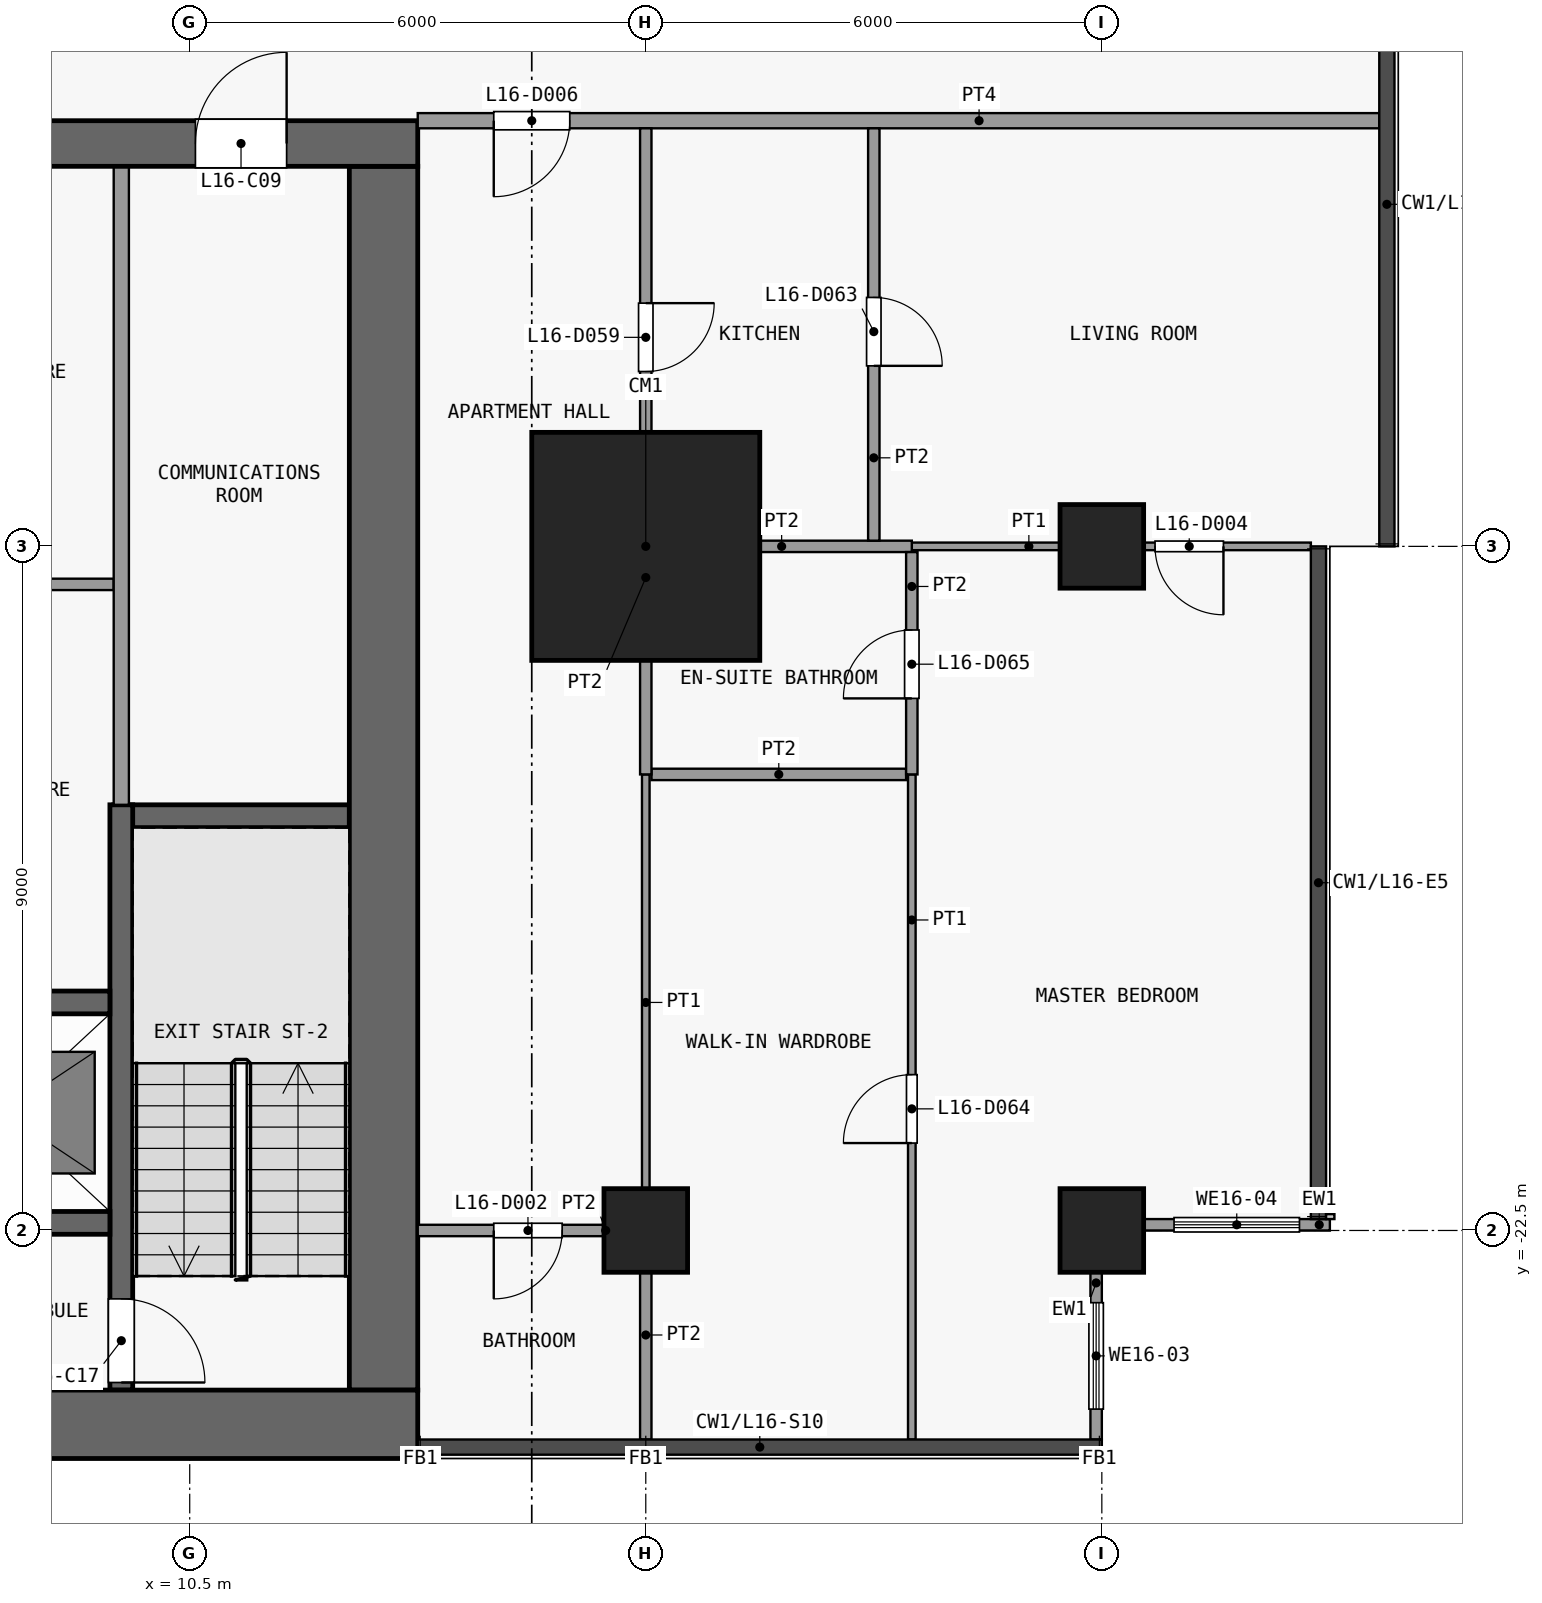
"""IFC4 building model, lengths in metres.
Left out: names, types, materials, properties, quantities, classifications, styles, units other than length and angle.
Written with IfcOpenShell. Run it as: python <this file> out.ifc"""

import sys

from ifc_helpers import new_model, si_unit, direction, frame, frame_2d, origin, origin_2d, place, context, subcontext, project, spatial, rectangle, extrude, element, fill, save


model = new_model("IFC4")
c1 = context("Model", 3, precision=1e-05, world=origin(), true_north=direction((0.0, 1.0)))
c2 = subcontext(c1, "Body", "Model", "MODEL_VIEW")
j1 = project(units=[si_unit("LENGTHUNIT", "METRE"), si_unit("PLANEANGLEUNIT", "RADIAN")], contexts=[c1])
p1 = place(None, origin())
s1 = spatial("IfcSite", under=j1, at=p1, CompositionType="ELEMENT")
p2 = place(p1, origin())
s2 = spatial("IfcBuilding", under=s1, at=p2, CompositionType="ELEMENT")
p3 = place(p2, frame((0.0, 0.0, 68.5)))
s3 = spatial("IfcBuildingStorey", under=s2, at=p3, CompositionType="ELEMENT", Elevation=68.5)
p4 = place(p3, frame((16.5, -22.5, 0.0), z_axis=(0.0, 0.0, 1.0), x_axis=(1.0, 0.0, 0.0)))
e1 = element("IfcColumn", 1, at=p4, inside=s3, PredefinedType="COLUMN", context=c2, shape_type="SweptSolid", body=[
    extrude(rectangle(XDim=1.1, YDim=1.1, at=origin_2d()), origin(), (0.0, 0.0, 1.0), 3.6),
])
p5 = place(p3, frame((16.5, -13.5, 0.0), z_axis=(0.0, 0.0, 1.0), x_axis=(1.0, 0.0, 0.0)))
e2 = element("IfcColumn", 2, at=p5, inside=s3, PredefinedType="COLUMN", context=c2, shape_type="SweptSolid", body=[
    extrude(rectangle(XDim=3.0, YDim=3.0, at=origin_2d()), origin(), (0.0, 0.0, 1.0), 3.6),
])
for number, where, z_axis, x_axis in (
    (3, (22.5, -22.5, 0.0), (0.0, 0.0, 1.0), (1.0, 0.0, 0.0)),
    (4, (22.5, -13.5, 0.0), (0.0, 0.0, 1.0), (1.0, 0.0, 0.0)),
):
    element("IfcColumn", number, at=place(p3, frame(where, z_axis=z_axis, x_axis=x_axis)), inside=s3, PredefinedType="COLUMN", context=c2, shape_type="SweptSolid", body=[
        extrude(rectangle(XDim=1.1, YDim=1.1, at=origin_2d()), origin(), (0.0, 0.0, 1.0), 3.6),
    ])
p6 = place(p3, frame((-13.5, -25.05, 0.0), z_axis=(0.0, 0.0, 1.0), x_axis=(1.0, 0.0, 0.0)))
e5 = element("IfcWall", 5, at=p6, inside=s3, PredefinedType="SHEAR", context=c2, shape_type="SweptSolid", body=[
    extrude(rectangle(XDim=27.0, YDim=0.9, at=frame_2d((13.5, 0.0))), origin(), (0.0, 0.0, 1.0), 3.3),
])
p7 = place(p3, frame((-13.5, -8.2, 0.0), z_axis=(0.0, 0.0, 1.0), x_axis=(1.0, 0.0, 0.0)))
e6 = element("IfcWall", 6, at=p7, inside=s3, PredefinedType="SHEAR", context=c2, shape_type="SweptSolid", body=[
    extrude(rectangle(XDim=27.0, YDim=0.6, at=frame_2d((13.5, 0.0))), origin(), (0.0, 0.0, 1.0), 3.3),
])
p8 = place(p7, frame((7.8, 0.0, 0.0)))
e7 = element("IfcOpeningElement", 7, at=p8, cuts=e6, PredefinedType="OPENING", context=c2, shape_type="SweptSolid", body=[
    extrude(rectangle(XDim=1.8, YDim=2.1, at=frame_2d((0.9, 1.05))), frame((0.0, 0.31, 0.0), z_axis=(0.0, -1.0, 0.0), x_axis=(1.0, 0.0, 0.0)), (0.0, 0.0, 1.0), 0.62),
])
p9 = place(p7, frame((17.4, 0.0, 0.0)))
e8 = element("IfcOpeningElement", 8, at=p9, cuts=e6, PredefinedType="OPENING", context=c2, shape_type="SweptSolid", body=[
    extrude(rectangle(XDim=1.8, YDim=2.1, at=frame_2d((0.9, 1.05))), frame((0.0, 0.31, 0.0), z_axis=(0.0, -1.0, 0.0), x_axis=(1.0, 0.0, 0.0)), (0.0, 0.0, 1.0), 0.62),
])
p10 = place(p7, frame((2.725, 0.0, 0.0)))
e9 = element("IfcOpeningElement", 9, at=p10, cuts=e6, PredefinedType="OPENING", context=c2, shape_type="SweptSolid", body=[
    extrude(rectangle(XDim=0.9, YDim=2.1, at=frame_2d((0.45, 1.05))), frame((0.0, 0.31, 0.0), z_axis=(0.0, -1.0, 0.0), x_axis=(1.0, 0.0, 0.0)), (0.0, 0.0, 1.0), 0.62),
])
p11 = place(p7, frame((24.075, 0.0, 0.0)))
e10 = element("IfcOpeningElement", 10, at=p11, cuts=e6, PredefinedType="OPENING", context=c2, shape_type="SweptSolid", body=[
    extrude(rectangle(XDim=1.2, YDim=2.1, at=frame_2d((0.6, 1.05))), frame((0.0, 0.31, 0.0), z_axis=(0.0, -1.0, 0.0), x_axis=(1.0, 0.0, 0.0)), (0.0, 0.0, 1.0), 0.62),
])
p12 = place(p3, frame((13.05, -24.6, 0.0), z_axis=(0.0, 0.0, 1.0), x_axis=(0.0, 1.0, 0.0)))
e11 = element("IfcWall", 11, at=p12, inside=s3, PredefinedType="SHEAR", context=c2, shape_type="SweptSolid", body=[
    extrude(rectangle(XDim=16.1, YDim=0.9, at=frame_2d((8.05, 0.0))), origin(), (0.0, 0.0, 1.0), 3.3),
])
p13 = place(p3, frame((6.35, -22.4, 0.0), z_axis=(0.0, 0.0, 1.0), x_axis=(1.0, 0.0, 0.0)))
e12 = element("IfcWall", 12, at=p13, inside=s3, PredefinedType="SHEAR", context=c2, shape_type="SweptSolid", body=[
    extrude(rectangle(XDim=3.1, YDim=0.3, at=frame_2d((1.55, 0.0))), origin(), (0.0, 0.0, 1.0), 3.3),
])
p14 = place(p3, frame((6.425, -19.5, 0.0), z_axis=(0.0, 0.0, 1.0), x_axis=(1.0, 0.0, 0.0)))
e13 = element("IfcWall", 13, at=p14, inside=s3, PredefinedType="SHEAR", context=c2, shape_type="SweptSolid", body=[
    extrude(rectangle(XDim=3.025, YDim=0.3, at=frame_2d((1.512, 0.0))), origin(), (0.0, 0.0, 1.0), 3.3),
])
p15 = place(p3, frame((9.5, -17.05, 0.0), z_axis=(0.0, 0.0, 1.0), x_axis=(1.0, 0.0, 0.0)))
e14 = element("IfcWall", 14, at=p15, inside=s3, PredefinedType="SHEAR", context=c2, shape_type="SweptSolid", body=[
    extrude(rectangle(XDim=3.1, YDim=0.3, at=frame_2d((1.55, 0.0))), origin(), (0.0, 0.0, 1.0), 3.3),
])
p16 = place(p3, frame((6.575, -14.0, 0.0), z_axis=(0.0, 0.0, 1.0), x_axis=(1.0, 0.0, 0.0)))
e15 = element("IfcWall", 15, at=p16, inside=s3, PredefinedType="PARTITIONING", context=c2, shape_type="SweptSolid", body=[
    extrude(rectangle(XDim=2.925, YDim=0.15, at=frame_2d((1.462, 0.0))), origin(), (0.0, 0.0, 1.0), 3.3),
])
p17 = place(p3, frame((9.6, -16.9, 0.0), z_axis=(0.0, 0.0, 1.0), x_axis=(0.0, -1.0, 0.0)))
e16 = element("IfcWall", 16, at=p17, inside=s3, PredefinedType="SHEAR", context=c2, shape_type="SweptSolid", body=[
    extrude(rectangle(XDim=7.7, YDim=0.3, at=frame_2d((3.85, 0.0))), origin(), (0.0, 0.0, 1.0), 3.3),
])
p18 = place(p17, frame((6.5, 0.0, 0.0)))
e17 = element("IfcOpeningElement", 17, at=p18, cuts=e16, PredefinedType="OPENING", context=c2, shape_type="SweptSolid", body=[
    extrude(rectangle(XDim=1.1, YDim=2.1, at=frame_2d((0.55, 1.05))), frame((0.0, 0.16, 0.0), z_axis=(0.0, -1.0, 0.0), x_axis=(1.0, 0.0, 0.0)), (0.0, 0.0, 1.0), 0.32),
])
p19 = place(p3, frame((9.6, -16.9, 0.0), z_axis=(0.0, 0.0, 1.0), x_axis=(0.0, 1.0, 0.0)))
e18 = element("IfcWall", 18, at=p19, inside=s3, PredefinedType="PARTITIONING", context=c2, shape_type="SweptSolid", body=[
    extrude(rectangle(XDim=8.4, YDim=0.2, at=frame_2d((4.2, 0.0))), origin(), (0.0, 0.0, 1.0), 3.3),
])
p20 = place(p3, frame((22.425, -23.05, 0.0), z_axis=(0.0, 0.0, 1.0), x_axis=(0.0, -1.0, 0.0)))
e19 = element("IfcWall", 19, at=p20, inside=s3, PredefinedType="SOLIDWALL", context=c2, shape_type="SweptSolid", body=[
    extrude(rectangle(XDim=2.2, YDim=0.15, at=frame_2d((1.1, 0.0))), origin(), (0.0, 0.0, 1.0), 3.3),
])
p21 = place(p20, frame((0.4, 0.0, 0.9)))
e20 = element("IfcOpeningElement", 20, at=p21, cuts=e19, PredefinedType="OPENING", context=c2, shape_type="SweptSolid", body=[
    extrude(rectangle(XDim=1.4, YDim=2.4, at=frame_2d((0.7, 1.2))), frame((0.0, 0.085, 0.0), z_axis=(0.0, -1.0, 0.0), x_axis=(1.0, 0.0, 0.0)), (0.0, 0.0, 1.0), 0.17),
])
p22 = place(p3, frame((25.5, -22.425, 0.0), z_axis=(0.0, 0.0, 1.0), x_axis=(-1.0, 0.0, 0.0)))
e21 = element("IfcWall", 21, at=p22, inside=s3, PredefinedType="SOLIDWALL", context=c2, shape_type="SweptSolid", body=[
    extrude(rectangle(XDim=2.45, YDim=0.15, at=frame_2d((1.225, 0.0))), origin(), (0.0, 0.0, 1.0), 3.3),
])
p23 = place(p22, frame((0.4, 0.0, 0.9)))
e22 = element("IfcOpeningElement", 22, at=p23, cuts=e21, PredefinedType="OPENING", context=c2, shape_type="SweptSolid", body=[
    extrude(rectangle(XDim=1.65, YDim=2.4, at=frame_2d((0.825, 1.2))), frame((0.0, 0.085, 0.0), z_axis=(0.0, -1.0, 0.0), x_axis=(1.0, 0.0, 0.0)), (0.0, 0.0, 1.0), 0.17),
])
p24 = place(p3, frame((13.5, -22.5, 0.0), z_axis=(0.0, 0.0, 1.0), x_axis=(1.0, 0.0, 0.0)))
e23 = element("IfcWall", 23, at=p24, inside=s3, PredefinedType="PARTITIONING", context=c2, shape_type="SweptSolid", body=[
    extrude(rectangle(XDim=2.925, YDim=0.15, at=frame_2d((1.462, 0.0))), origin(), (0.0, 0.0, 1.0), 3.3),
])
p25 = place(p24, frame((1.0, 0.0, 0.0)))
e24 = element("IfcOpeningElement", 24, at=p25, cuts=e23, PredefinedType="OPENING", context=c2, shape_type="SweptSolid", body=[
    extrude(rectangle(XDim=0.9, YDim=2.1, at=frame_2d((0.45, 1.05))), frame((0.0, 0.085, 0.0), z_axis=(0.0, -1.0, 0.0), x_axis=(1.0, 0.0, 0.0)), (0.0, 0.0, 1.0), 0.17),
])
p26 = place(p3, frame((16.575, -16.5, 0.0), z_axis=(0.0, 0.0, 1.0), x_axis=(1.0, 0.0, 0.0)))
e25 = element("IfcWall", 25, at=p26, inside=s3, PredefinedType="PARTITIONING", context=c2, shape_type="SweptSolid", body=[
    extrude(rectangle(XDim=3.35, YDim=0.15, at=frame_2d((1.675, 0.0))), origin(), (0.0, 0.0, 1.0), 3.3),
])
p27 = place(p3, frame((20.0, -13.5, 0.0), z_axis=(0.0, 0.0, 1.0), x_axis=(1.0, 0.0, 0.0)))
e26 = element("IfcWall", 26, at=p27, inside=s3, PredefinedType="PARTITIONING", context=c2, shape_type="SweptSolid", body=[
    extrude(rectangle(XDim=5.25, YDim=0.1, at=frame_2d((2.625, 0.0))), origin(), (0.0, 0.0, 1.0), 3.3),
])
p28 = place(p27, frame((3.2, 0.0, 0.0)))
e27 = element("IfcOpeningElement", 27, at=p28, cuts=e26, PredefinedType="OPENING", context=c2, shape_type="SweptSolid", body=[
    extrude(rectangle(XDim=0.9, YDim=2.1, at=frame_2d((0.45, 1.05))), frame((0.0, 0.06, 0.0), z_axis=(0.0, -1.0, 0.0), x_axis=(1.0, 0.0, 0.0)), (0.0, 0.0, 1.0), 0.12),
])
p29 = place(p3, frame((16.575, -13.5, 0.0), z_axis=(0.0, 0.0, 1.0), x_axis=(1.0, 0.0, 0.0)))
e28 = element("IfcWall", 28, at=p29, inside=s3, PredefinedType="PARTITIONING", context=c2, shape_type="SweptSolid", body=[
    extrude(rectangle(XDim=3.425, YDim=0.15, at=frame_2d((1.712, 0.0))), origin(), (0.0, 0.0, 1.0), 3.3),
])
p30 = place(p3, frame((13.5, -7.9, 0.0), z_axis=(0.0, 0.0, 1.0), x_axis=(1.0, 0.0, 0.0)))
e29 = element("IfcWall", 29, at=p30, inside=s3, PredefinedType="PARTITIONING", context=c2, shape_type="SweptSolid", body=[
    extrude(rectangle(XDim=12.65, YDim=0.2, at=frame_2d((6.325, 0.0))), origin(), (0.0, 0.0, 1.0), 3.3),
])
p31 = place(p30, frame((1.0, 0.0, 0.0)))
e30 = element("IfcOpeningElement", 30, at=p31, cuts=e29, PredefinedType="OPENING", context=c2, shape_type="SweptSolid", body=[
    extrude(rectangle(XDim=1.0, YDim=2.1, at=frame_2d((0.5, 1.05))), frame((0.0, 0.11, 0.0), z_axis=(0.0, -1.0, 0.0), x_axis=(1.0, 0.0, 0.0)), (0.0, 0.0, 1.0), 0.22),
])
p32 = place(p3, frame((16.5, -22.5, 0.0), z_axis=(0.0, 0.0, 1.0), x_axis=(0.0, 1.0, 0.0)))
e31 = element("IfcWall", 31, at=p32, inside=s3, PredefinedType="PARTITIONING", context=c2, shape_type="SweptSolid", body=[
    extrude(rectangle(XDim=6.0, YDim=0.1, at=frame_2d((3.0, 0.0))), origin(), (0.0, 0.0, 1.0), 3.3),
])
p33 = place(p3, frame((16.5, -25.25, 0.0), z_axis=(0.0, 0.0, 1.0), x_axis=(0.0, 1.0, 0.0)))
e32 = element("IfcWall", 32, at=p33, inside=s3, PredefinedType="PARTITIONING", context=c2, shape_type="SweptSolid", body=[
    extrude(rectangle(XDim=2.75, YDim=0.15, at=frame_2d((1.375, 0.0))), origin(), (0.0, 0.0, 1.0), 3.3),
])
p34 = place(p3, frame((16.5, -16.5, 0.0), z_axis=(0.0, 0.0, 1.0), x_axis=(0.0, 1.0, 0.0)))
e33 = element("IfcWall", 33, at=p34, inside=s3, PredefinedType="PARTITIONING", context=c2, shape_type="SweptSolid", body=[
    extrude(rectangle(XDim=8.5, YDim=0.15, at=frame_2d((4.25, 0.0))), origin(), (0.0, 0.0, 1.0), 3.3),
])
p35 = place(p34, frame((5.3, 0.0, 0.0)))
e34 = element("IfcOpeningElement", 34, at=p35, cuts=e33, PredefinedType="OPENING", context=c2, shape_type="SweptSolid", body=[
    extrude(rectangle(XDim=0.9, YDim=2.1, at=frame_2d((0.45, 1.05))), frame((0.0, 0.085, 0.0), z_axis=(0.0, -1.0, 0.0), x_axis=(1.0, 0.0, 0.0)), (0.0, 0.0, 1.0), 0.17),
])
p36 = place(p3, frame((19.5, -13.425, 0.0), z_axis=(0.0, 0.0, 1.0), x_axis=(0.0, 1.0, 0.0)))
e35 = element("IfcWall", 35, at=p36, inside=s3, PredefinedType="PARTITIONING", context=c2, shape_type="SweptSolid", body=[
    extrude(rectangle(XDim=5.425, YDim=0.15, at=frame_2d((2.712, 0.0))), origin(), (0.0, 0.0, 1.0), 3.3),
])
p37 = place(p36, frame((2.3, 0.0, 0.0)))
e36 = element("IfcOpeningElement", 36, at=p37, cuts=e35, PredefinedType="OPENING", context=c2, shape_type="SweptSolid", body=[
    extrude(rectangle(XDim=0.9, YDim=2.1, at=frame_2d((0.45, 1.05))), frame((0.0, 0.085, 0.0), z_axis=(0.0, -1.0, 0.0), x_axis=(1.0, 0.0, 0.0)), (0.0, 0.0, 1.0), 0.17),
])
p38 = place(p3, frame((20.0, -25.25, 0.0), z_axis=(0.0, 0.0, 1.0), x_axis=(0.0, 1.0, 0.0)))
e37 = element("IfcWall", 37, at=p38, inside=s3, PredefinedType="PARTITIONING", context=c2, shape_type="SweptSolid", body=[
    extrude(rectangle(XDim=8.75, YDim=0.1, at=frame_2d((4.375, 0.0))), origin(), (0.0, 0.0, 1.0), 3.3),
])
p39 = place(p38, frame((3.9, 0.0, 0.0)))
e38 = element("IfcOpeningElement", 38, at=p39, cuts=e37, PredefinedType="OPENING", context=c2, shape_type="SweptSolid", body=[
    extrude(rectangle(XDim=0.9, YDim=2.1, at=frame_2d((0.45, 1.05))), frame((0.0, 0.06, 0.0), z_axis=(0.0, -1.0, 0.0), x_axis=(1.0, 0.0, 0.0)), (0.0, 0.0, 1.0), 0.12),
])
p40 = place(p3, frame((20.0, -16.5, 0.0), z_axis=(0.0, 0.0, 1.0), x_axis=(0.0, 1.0, 0.0)))
e39 = element("IfcWall", 39, at=p40, inside=s3, PredefinedType="PARTITIONING", context=c2, shape_type="SweptSolid", body=[
    extrude(rectangle(XDim=2.925, YDim=0.15, at=frame_2d((1.462, 0.0))), origin(), (0.0, 0.0, 1.0), 3.3),
])
p41 = place(p40, frame((1.0, 0.0, 0.0)))
e40 = element("IfcOpeningElement", 40, at=p41, cuts=e39, PredefinedType="OPENING", context=c2, shape_type="SweptSolid", body=[
    extrude(rectangle(XDim=0.9, YDim=2.1, at=frame_2d((0.45, 1.05))), frame((0.0, 0.085, 0.0), z_axis=(0.0, -1.0, 0.0), x_axis=(1.0, 0.0, 0.0)), (0.0, 0.0, 1.0), 0.17),
])
p42 = place(p11, origin())
e41 = element("IfcDoor", 41, at=p42, inside=s3, OperationType="SINGLE_SWING_RIGHT", PredefinedType="DOOR", context=c2, shape_type="SweptSolid", body=[
    extrude(rectangle(XDim=1.2, YDim=2.1, at=frame_2d((0.6, 1.05))), frame((0.0, 0.025, 0.0), z_axis=(0.0, -1.0, 0.0), x_axis=(1.0, 0.0, 0.0)), (0.0, 0.0, 1.0), 0.05),
])
fill(e10, e41)
p43 = place(p18, origin())
e42 = element("IfcDoor", 42, at=p43, inside=s3, OperationType="SINGLE_SWING_RIGHT", PredefinedType="DOOR", context=c2, shape_type="SweptSolid", body=[
    extrude(rectangle(XDim=1.1, YDim=2.1, at=frame_2d((0.55, 1.05))), frame((0.0, 0.025, 0.0), z_axis=(0.0, -1.0, 0.0), x_axis=(1.0, 0.0, 0.0)), (0.0, 0.0, 1.0), 0.05),
])
fill(e17, e42)
p44 = place(p21, origin())
e43 = element("IfcWindow", 43, at=p44, inside=s3, PartitioningType="SINGLE_PANEL", PredefinedType="WINDOW", context=c2, shape_type="SweptSolid", body=[
    extrude(rectangle(XDim=1.4, YDim=2.4, at=frame_2d((0.7, 1.2))), frame((0.0, 0.03, 0.0), z_axis=(0.0, -1.0, 0.0), x_axis=(1.0, 0.0, 0.0)), (0.0, 0.0, 1.0), 0.06),
])
fill(e20, e43)
p45 = place(p23, origin())
e44 = element("IfcWindow", 44, at=p45, inside=s3, PartitioningType="SINGLE_PANEL", PredefinedType="WINDOW", context=c2, shape_type="SweptSolid", body=[
    extrude(rectangle(XDim=1.65, YDim=2.4, at=frame_2d((0.825, 1.2))), frame((0.0, 0.03, 0.0), z_axis=(0.0, -1.0, 0.0), x_axis=(1.0, 0.0, 0.0)), (0.0, 0.0, 1.0), 0.06),
])
fill(e22, e44)
p46 = place(p25, origin())
e45 = element("IfcDoor", 45, at=p46, inside=s3, OperationType="SINGLE_SWING_LEFT", PredefinedType="DOOR", context=c2, shape_type="SweptSolid", body=[
    extrude(rectangle(XDim=0.9, YDim=2.1, at=frame_2d((0.45, 1.05))), frame((0.0, 0.025, 0.0), z_axis=(0.0, -1.0, 0.0), x_axis=(1.0, 0.0, 0.0)), (0.0, 0.0, 1.0), 0.05),
])
fill(e24, e45)
p47 = place(p28, origin())
e46 = element("IfcDoor", 46, at=p47, inside=s3, OperationType="SINGLE_SWING_RIGHT", PredefinedType="DOOR", context=c2, shape_type="SweptSolid", body=[
    extrude(rectangle(XDim=0.9, YDim=2.1, at=frame_2d((0.45, 1.05))), frame((0.0, 0.025, 0.0), z_axis=(0.0, -1.0, 0.0), x_axis=(1.0, 0.0, 0.0)), (0.0, 0.0, 1.0), 0.05),
])
fill(e27, e46)
p48 = place(p31, origin())
e47 = element("IfcDoor", 47, at=p48, inside=s3, OperationType="SINGLE_SWING_LEFT", PredefinedType="DOOR", context=c2, shape_type="SweptSolid", body=[
    extrude(rectangle(XDim=1.0, YDim=2.1, at=frame_2d((0.5, 1.05))), frame((0.0, 0.025, 0.0), z_axis=(0.0, -1.0, 0.0), x_axis=(1.0, 0.0, 0.0)), (0.0, 0.0, 1.0), 0.05),
])
fill(e30, e47)
p49 = place(p35, origin())
e48 = element("IfcDoor", 48, at=p49, inside=s3, OperationType="SINGLE_SWING_RIGHT", PredefinedType="DOOR", context=c2, shape_type="SweptSolid", body=[
    extrude(rectangle(XDim=0.9, YDim=2.1, at=frame_2d((0.45, 1.05))), frame((0.0, 0.025, 0.0), z_axis=(0.0, -1.0, 0.0), x_axis=(1.0, 0.0, 0.0)), (0.0, 0.0, 1.0), 0.05),
])
fill(e34, e48)
p50 = place(p37, origin())
e49 = element("IfcDoor", 49, at=p50, inside=s3, OperationType="SINGLE_SWING_LEFT", PredefinedType="DOOR", context=c2, shape_type="SweptSolid", body=[
    extrude(rectangle(XDim=0.9, YDim=2.1, at=frame_2d((0.45, 1.05))), frame((0.0, 0.025, 0.0), z_axis=(0.0, -1.0, 0.0), x_axis=(1.0, 0.0, 0.0)), (0.0, 0.0, 1.0), 0.05),
])
fill(e36, e49)
p51 = place(p39, origin())
e50 = element("IfcDoor", 50, at=p51, inside=s3, OperationType="SINGLE_SWING_RIGHT", PredefinedType="DOOR", context=c2, shape_type="SweptSolid", body=[
    extrude(rectangle(XDim=0.9, YDim=2.1, at=frame_2d((0.45, 1.05))), frame((0.0, 0.025, 0.0), z_axis=(0.0, -1.0, 0.0), x_axis=(1.0, 0.0, 0.0)), (0.0, 0.0, 1.0), 0.05),
])
fill(e38, e50)
p52 = place(p41, origin())
e51 = element("IfcDoor", 51, at=p52, inside=s3, OperationType="SINGLE_SWING_RIGHT", PredefinedType="DOOR", context=c2, shape_type="SweptSolid", body=[
    extrude(rectangle(XDim=0.9, YDim=2.1, at=frame_2d((0.45, 1.05))), frame((0.0, 0.025, 0.0), z_axis=(0.0, -1.0, 0.0), x_axis=(1.0, 0.0, 0.0)), (0.0, 0.0, 1.0), 0.05),
])
fill(e40, e51)
save(model, sys.argv[1])
